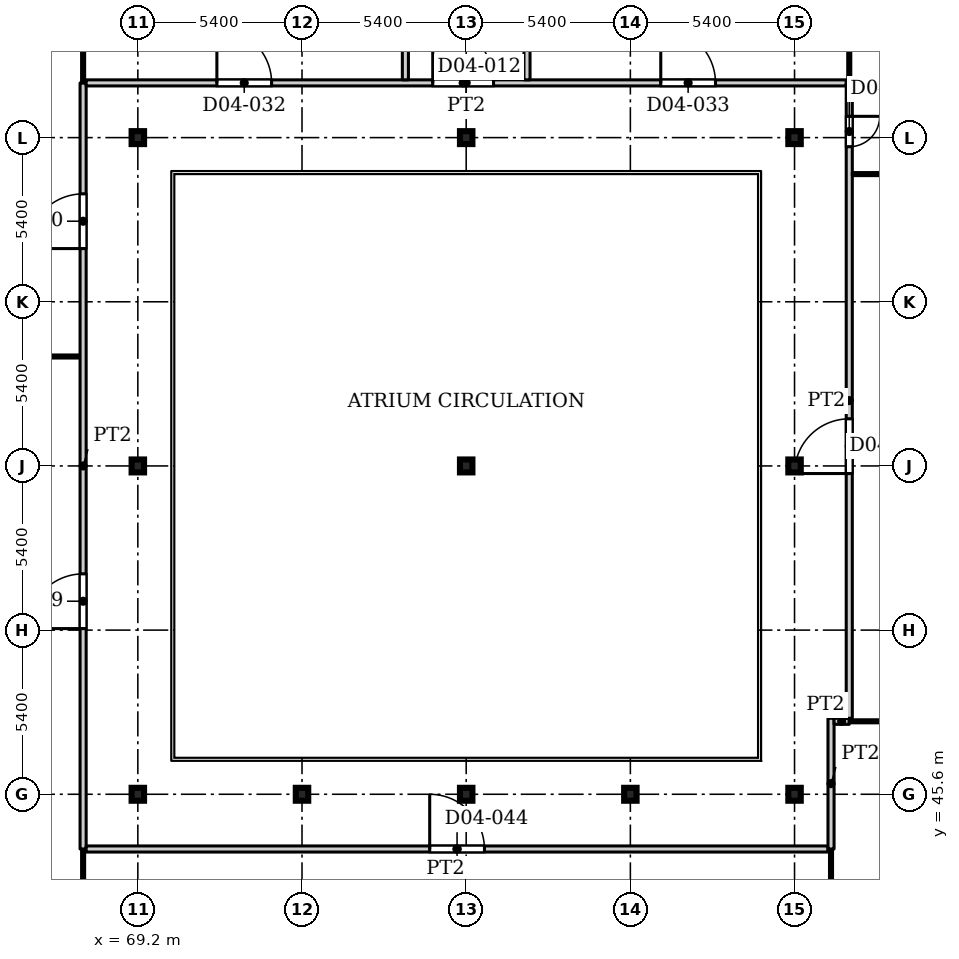
"""IFC4 building model, lengths in metres.
Left out: names, types, materials, properties, quantities, classifications, styles, units other than length and angle.
Written with IfcOpenShell. Run it as: python <this file> out.ifc"""

import sys

from ifc_helpers import new_model, si_unit, direction, frame, frame_2d, origin, origin_2d, place, context, subcontext, project, spatial, rectangle, i_section, extrude, source, transform, mapped, element, fill, save


model = new_model("IFC4")
c1 = context("Model", 3, precision=1e-05, world=origin(), true_north=direction((0.0, 1.0)))
c2 = subcontext(c1, "Body", "Model", "MODEL_VIEW")
j1 = project(units=[si_unit("LENGTHUNIT", "METRE"), si_unit("PLANEANGLEUNIT", "RADIAN")], contexts=[c1])
p1 = place(None, origin())
s1 = spatial("IfcSite", under=j1, at=p1, CompositionType="ELEMENT")
p2 = place(p1, origin())
s2 = spatial("IfcBuilding", under=s1, at=p2, CompositionType="ELEMENT")
p3 = place(p2, frame((0.0, 0.0, 21.5)))
s3 = spatial("IfcBuildingStorey", under=s2, at=p3, CompositionType="ELEMENT", Elevation=21.5)
for number, where, z_axis, x_axis in (
    (1, (69.2, 45.6, 0.0), (0.0, 0.0, 1.0), (1.0, 0.0, 0.0)),
    (2, (80.0, 45.6, 0.0), (0.0, 0.0, 1.0), (1.0, 0.0, 0.0)),
    (3, (90.8, 45.6, 0.0), (0.0, 0.0, 1.0), (1.0, 0.0, 0.0)),
    (4, (69.2, 56.4, 0.0), (0.0, 0.0, 1.0), (1.0, 0.0, 0.0)),
    (5, (80.0, 56.4, 0.0), (0.0, 0.0, 1.0), (1.0, 0.0, 0.0)),
    (6, (90.8, 56.4, 0.0), (0.0, 0.0, 1.0), (1.0, 0.0, 0.0)),
    (7, (69.2, 67.2, 0.0), (0.0, 0.0, 1.0), (1.0, 0.0, 0.0)),
    (8, (80.0, 67.2, 0.0), (0.0, 0.0, 1.0), (1.0, 0.0, 0.0)),
    (9, (90.8, 67.2, 0.0), (0.0, 0.0, 1.0), (1.0, 0.0, 0.0)),
    (10, (74.6, 45.6, 0.0), (0.0, 0.0, 1.0), (1.0, 0.0, 0.0)),
    (11, (85.4, 45.6, 0.0), (0.0, 0.0, 1.0), (1.0, 0.0, 0.0)),
):
    element("IfcColumn", number, at=place(p3, frame(where, z_axis=z_axis, x_axis=x_axis)), inside=s3, PredefinedType="COLUMN", context=c2, shape_type="SweptSolid", body=[
        extrude(i_section(OverallWidth=0.409, OverallDepth=0.425, WebThickness=0.033, FlangeThickness=0.052, FilletRadius=0.013, at=origin_2d()), origin(), (0.0, 0.0, 1.0), 4.5),
    ])
p4 = place(p3, frame((33.45, 60.0, 0.0), z_axis=(0.0, 0.0, 1.0), x_axis=(1.0, 0.0, 0.0)))
e12 = element("IfcWall", 12, at=p4, inside=s3, PredefinedType="PARTITIONING", context=c2, shape_type="SweptSolid", body=[
    extrude(rectangle(XDim=33.85, YDim=0.1, at=frame_2d((16.925, 0.0))), origin(), (0.0, 0.0, 1.0), 4.18),
])
p5 = place(p3, frame((67.4, 30.05, 0.0), z_axis=(0.0, 0.0, 1.0), x_axis=(0.0, 1.0, 0.0)))
e13 = element("IfcWall", 13, at=p5, inside=s3, PredefinedType="PARTITIONING", context=c2, shape_type="SweptSolid", body=[
    extrude(rectangle(XDim=13.75, YDim=0.1, at=frame_2d((6.875, 0.0))), origin(), (0.0, 0.0, 1.0), 4.18),
])
p6 = place(p3, frame((67.4, 43.8, 0.0), z_axis=(0.0, 0.0, 1.0), x_axis=(0.0, 1.0, 0.0)))
e14 = element("IfcWall", 14, at=p6, inside=s3, PredefinedType="PARTITIONING", context=c2, shape_type="SweptSolid", body=[
    extrude(rectangle(XDim=25.2, YDim=0.2, at=frame_2d((12.6, 0.0))), origin(), (0.0, 0.0, 1.0), 4.18),
])
p7 = place(p6, frame((7.25, 0.0, 0.0)))
e15 = element("IfcOpeningElement", 15, at=p7, cuts=e14, PredefinedType="OPENING", context=c2, shape_type="SweptSolid", body=[
    extrude(rectangle(XDim=1.8, YDim=2.1, at=frame_2d((0.9, 1.05))), frame((0.0, 0.11, 0.0), z_axis=(0.0, -1.0, 0.0), x_axis=(1.0, 0.0, 0.0)), (0.0, 0.0, 1.0), 0.22),
])
p8 = place(p6, frame((19.75, 0.0, 0.0)))
e16 = element("IfcOpeningElement", 16, at=p8, cuts=e14, PredefinedType="OPENING", context=c2, shape_type="SweptSolid", body=[
    extrude(rectangle(XDim=1.8, YDim=2.1, at=frame_2d((0.9, 1.05))), frame((0.0, 0.11, 0.0), z_axis=(0.0, -1.0, 0.0), x_axis=(1.0, 0.0, 0.0)), (0.0, 0.0, 1.0), 0.22),
])
p9 = place(p3, frame((67.4, 69.0, 0.0), z_axis=(0.0, 0.0, 1.0), x_axis=(0.0, 1.0, 0.0)))
e17 = element("IfcWall", 17, at=p9, inside=s3, PredefinedType="PARTITIONING", context=c2, shape_type="SweptSolid", body=[
    extrude(rectangle(XDim=21.738, YDim=0.1, at=frame_2d((10.869, 0.0))), origin(), (0.0, 0.0, 1.0), 4.18),
])
p10 = place(p3, frame((67.5, 43.8, 0.0), z_axis=(0.0, 0.0, 1.0), x_axis=(1.0, 0.0, 0.0)))
e18 = element("IfcWall", 18, at=p10, inside=s3, PredefinedType="PARTITIONING", context=c2, shape_type="SweptSolid", body=[
    extrude(rectangle(XDim=24.4, YDim=0.2, at=frame_2d((12.2, 0.0))), origin(), (0.0, 0.0, 1.0), 4.18),
])
p11 = place(p10, frame((11.3, 0.0, 0.0)))
e19 = element("IfcOpeningElement", 19, at=p11, cuts=e18, PredefinedType="OPENING", context=c2, shape_type="SweptSolid", body=[
    extrude(rectangle(XDim=1.8, YDim=2.1, at=frame_2d((0.9, 1.05))), frame((0.0, 0.11, 0.0), z_axis=(0.0, -1.0, 0.0), x_axis=(1.0, 0.0, 0.0)), (0.0, 0.0, 1.0), 0.22),
])
p12 = place(p3, frame((67.5, 69.0, 0.0), z_axis=(0.0, 0.0, 1.0), x_axis=(1.0, 0.0, 0.0)))
e20 = element("IfcWall", 20, at=p12, inside=s3, PredefinedType="PARTITIONING", context=c2, shape_type="SweptSolid", body=[
    extrude(rectangle(XDim=25.0, YDim=0.2, at=frame_2d((12.5, 0.0))), origin(), (0.0, 0.0, 1.0), 4.18),
])
p13 = place(p12, frame((11.4, 0.0, 0.0)))
e21 = element("IfcOpeningElement", 21, at=p13, cuts=e20, PredefinedType="OPENING", context=c2, shape_type="SweptSolid", body=[
    extrude(rectangle(XDim=2.0, YDim=2.1, at=frame_2d((1.0, 1.05))), frame((0.0, 0.11, 0.0), z_axis=(0.0, -1.0, 0.0), x_axis=(1.0, 0.0, 0.0)), (0.0, 0.0, 1.0), 0.22),
])
p14 = place(p12, frame((4.3, 0.0, 0.0)))
e22 = element("IfcOpeningElement", 22, at=p14, cuts=e20, PredefinedType="OPENING", context=c2, shape_type="SweptSolid", body=[
    extrude(rectangle(XDim=1.8, YDim=2.1, at=frame_2d((0.9, 1.05))), frame((0.0, 0.11, 0.0), z_axis=(0.0, -1.0, 0.0), x_axis=(1.0, 0.0, 0.0)), (0.0, 0.0, 1.0), 0.22),
])
p15 = place(p12, frame((18.9, 0.0, 0.0)))
e23 = element("IfcOpeningElement", 23, at=p15, cuts=e20, PredefinedType="OPENING", context=c2, shape_type="SweptSolid", body=[
    extrude(rectangle(XDim=1.8, YDim=2.1, at=frame_2d((0.9, 1.05))), frame((0.0, 0.11, 0.0), z_axis=(0.0, -1.0, 0.0), x_axis=(1.0, 0.0, 0.0)), (0.0, 0.0, 1.0), 0.22),
])
for number, where, z_axis, x_axis in (
    (24, (78.0, 69.1, 0.0), (0.0, 0.0, 1.0), (0.0, 1.0, 0.0)),
    (25, (82.0, 69.1, 0.0), (0.0, 0.0, 1.0), (0.0, 1.0, 0.0)),
):
    element("IfcWall", number, at=place(p3, frame(where, z_axis=z_axis, x_axis=x_axis)), inside=s3, PredefinedType="PARTITIONING", context=c2, shape_type="SweptSolid", body=[
        extrude(rectangle(XDim=21.6, YDim=0.2, at=frame_2d((10.8, 0.0))), origin(), (0.0, 0.0, 1.0), 4.18),
    ])
p16 = place(p3, frame((92.0, 35.2, 0.0), z_axis=(0.0, 0.0, 1.0), x_axis=(0.0, 1.0, 0.0)))
e26 = element("IfcWall", 26, at=p16, inside=s3, PredefinedType="PARTITIONING", context=c2, shape_type="SweptSolid", body=[
    extrude(rectangle(XDim=8.6, YDim=0.1, at=frame_2d((4.3, 0.0))), origin(), (0.0, 0.0, 1.0), 4.18),
])
p17 = place(p3, frame((92.0, 43.8, 0.0), z_axis=(0.0, 0.0, 1.0), x_axis=(0.0, 1.0, 0.0)))
e27 = element("IfcWall", 27, at=p17, inside=s3, PredefinedType="PARTITIONING", context=c2, shape_type="SweptSolid", body=[
    extrude(rectangle(XDim=4.3, YDim=0.2, at=frame_2d((2.15, 0.0))), origin(), (0.0, 0.0, 1.0), 4.18),
])
p18 = place(p3, frame((92.1, 48.0, 0.0), z_axis=(0.0, 0.0, 1.0), x_axis=(1.0, 0.0, 0.0)))
e28 = element("IfcWall", 28, at=p18, inside=s3, PredefinedType="PARTITIONING", context=c2, shape_type="SweptSolid", body=[
    extrude(rectangle(XDim=0.5, YDim=0.2, at=frame_2d((0.25, 0.0))), origin(), (0.0, 0.0, 1.0), 4.18),
])
p19 = place(p3, frame((92.6, 48.0, 0.0), z_axis=(0.0, 0.0, 1.0), x_axis=(1.0, 0.0, 0.0)))
e29 = element("IfcWall", 29, at=p19, inside=s3, PredefinedType="PARTITIONING", context=c2, shape_type="SweptSolid", body=[
    extrude(rectangle(XDim=20.138, YDim=0.1, at=frame_2d((10.069, 0.0))), origin(), (0.0, 0.0, 1.0), 4.18),
])
p20 = place(p3, frame((92.6, 48.1, 0.0), z_axis=(0.0, 0.0, 1.0), x_axis=(0.0, 1.0, 0.0)))
e30 = element("IfcWall", 30, at=p20, inside=s3, PredefinedType="PARTITIONING", context=c2, shape_type="SweptSolid", body=[
    extrude(rectangle(XDim=20.9, YDim=0.2, at=frame_2d((10.45, 0.0))), origin(), (0.0, 0.0, 1.0), 4.18),
])
p21 = place(p20, frame((8.05, 0.0, 0.0)))
e31 = element("IfcOpeningElement", 31, at=p21, cuts=e30, PredefinedType="OPENING", context=c2, shape_type="SweptSolid", body=[
    extrude(rectangle(XDim=1.8, YDim=2.1, at=frame_2d((0.9, 1.05))), frame((0.0, 0.11, 0.0), z_axis=(0.0, -1.0, 0.0), x_axis=(1.0, 0.0, 0.0)), (0.0, 0.0, 1.0), 0.22),
])
p22 = place(p20, frame((18.8, 0.0, 0.0)))
e32 = element("IfcOpeningElement", 32, at=p22, cuts=e30, PredefinedType="OPENING", context=c2, shape_type="SweptSolid", body=[
    extrude(rectangle(XDim=1.0, YDim=2.1, at=frame_2d((0.5, 1.05))), frame((0.0, 0.11, 0.0), z_axis=(0.0, -1.0, 0.0), x_axis=(1.0, 0.0, 0.0)), (0.0, 0.0, 1.0), 0.22),
])
p23 = place(p3, frame((92.6, 69.0, 0.0), z_axis=(0.0, 0.0, 1.0), x_axis=(0.0, 1.0, 0.0)))
e33 = element("IfcWall", 33, at=p23, inside=s3, PredefinedType="PARTITIONING", context=c2, shape_type="SweptSolid", body=[
    extrude(rectangle(XDim=21.738, YDim=0.1, at=frame_2d((10.869, 0.0))), origin(), (0.0, 0.0, 1.0), 4.18),
])
p24 = place(p3, frame((92.7, 66.0, 0.0), z_axis=(0.0, 0.0, 1.0), x_axis=(1.0, 0.0, 0.0)))
e34 = element("IfcWall", 34, at=p24, inside=s3, PredefinedType="PARTITIONING", context=c2, shape_type="SweptSolid", body=[
    extrude(rectangle(XDim=20.038, YDim=0.1, at=frame_2d((10.019, 0.0))), origin(), (0.0, 0.0, 1.0), 4.18),
])
m1 = source(origin(), c2, "Body", "SweptSolid", [
    extrude(rectangle(XDim=1.8, YDim=2.1, at=frame_2d((0.9, 1.05))), frame((0.0, 0.025, 0.0), z_axis=(0.0, -1.0, 0.0), x_axis=(1.0, 0.0, 0.0)), (0.0, 0.0, 1.0), 0.05),
])
p25 = place(p21, origin())
e35 = element("IfcDoor", 35, at=p25, inside=s3, OperationType="DOUBLE_DOOR_SINGLE_SWING", PredefinedType="DOOR", context=c2, shape_type="MappedRepresentation", body=[
    mapped(m1, transform((0.0, 0.0, 0.0), x_axis=(1.0, 0.0, 0.0), y_axis=(0.0, 1.0, 0.0), z_axis=(0.0, 0.0, 1.0), scale=1.0)),
])
fill(e31, e35)
m2 = source(origin(), c2, "Body", "SweptSolid", [
    extrude(rectangle(XDim=1.0, YDim=2.1, at=frame_2d((0.5, 1.05))), frame((0.0, 0.025, 0.0), z_axis=(0.0, -1.0, 0.0), x_axis=(1.0, 0.0, 0.0)), (0.0, 0.0, 1.0), 0.05),
])
p26 = place(p22, origin())
e36 = element("IfcDoor", 36, at=p26, inside=s3, OperationType="SINGLE_SWING_RIGHT", PredefinedType="DOOR", context=c2, shape_type="MappedRepresentation", body=[
    mapped(m2, transform((0.0, 0.0, 0.0), x_axis=(1.0, 0.0, 0.0), y_axis=(0.0, 1.0, 0.0), z_axis=(0.0, 0.0, 1.0), scale=1.0)),
])
fill(e32, e36)
m3 = source(origin(), c2, "Body", "SweptSolid", [
    extrude(rectangle(XDim=2.0, YDim=2.1, at=frame_2d((1.0, 1.05))), frame((0.0, 0.025, 0.0), z_axis=(0.0, -1.0, 0.0), x_axis=(1.0, 0.0, 0.0)), (0.0, 0.0, 1.0), 0.05),
])
p27 = place(p13, origin())
e37 = element("IfcDoor", 37, at=p27, inside=s3, OperationType="DOUBLE_DOOR_SINGLE_SWING", PredefinedType="DOOR", context=c2, shape_type="MappedRepresentation", body=[
    mapped(m3, transform((0.0, 0.0, 0.0), x_axis=(1.0, 0.0, 0.0), y_axis=(0.0, 1.0, 0.0), z_axis=(0.0, 0.0, 1.0), scale=1.0)),
])
fill(e21, e37)
p28 = place(p14, origin())
e38 = element("IfcDoor", 38, at=p28, inside=s3, OperationType="DOUBLE_DOOR_SINGLE_SWING", PredefinedType="DOOR", context=c2, shape_type="MappedRepresentation", body=[
    mapped(m1, transform((0.0, 0.0, 0.0), x_axis=(1.0, 0.0, 0.0), y_axis=(0.0, 1.0, 0.0), z_axis=(0.0, 0.0, 1.0), scale=1.0)),
])
fill(e22, e38)
p29 = place(p15, origin())
e39 = element("IfcDoor", 39, at=p29, inside=s3, OperationType="DOUBLE_DOOR_SINGLE_SWING", PredefinedType="DOOR", context=c2, shape_type="MappedRepresentation", body=[
    mapped(m1, transform((0.0, 0.0, 0.0), x_axis=(1.0, 0.0, 0.0), y_axis=(0.0, 1.0, 0.0), z_axis=(0.0, 0.0, 1.0), scale=1.0)),
])
fill(e23, e39)
p30 = place(p11, origin())
e40 = element("IfcDoor", 40, at=p30, inside=s3, OperationType="DOUBLE_DOOR_SINGLE_SWING", PredefinedType="DOOR", context=c2, shape_type="MappedRepresentation", body=[
    mapped(m1, transform((0.0, 0.0, 0.0), x_axis=(1.0, 0.0, 0.0), y_axis=(0.0, 1.0, 0.0), z_axis=(0.0, 0.0, 1.0), scale=1.0)),
])
fill(e19, e40)
p31 = place(p7, origin())
e41 = element("IfcDoor", 41, at=p31, inside=s3, OperationType="DOUBLE_DOOR_SINGLE_SWING", PredefinedType="DOOR", context=c2, shape_type="MappedRepresentation", body=[
    mapped(m1, transform((0.0, 0.0, 0.0), x_axis=(1.0, 0.0, 0.0), y_axis=(0.0, 1.0, 0.0), z_axis=(0.0, 0.0, 1.0), scale=1.0)),
])
fill(e15, e41)
p32 = place(p8, origin())
e42 = element("IfcDoor", 42, at=p32, inside=s3, OperationType="DOUBLE_DOOR_SINGLE_SWING", PredefinedType="DOOR", context=c2, shape_type="MappedRepresentation", body=[
    mapped(m1, transform((0.0, 0.0, 0.0), x_axis=(1.0, 0.0, 0.0), y_axis=(0.0, 1.0, 0.0), z_axis=(0.0, 0.0, 1.0), scale=1.0)),
])
fill(e16, e42)
save(model, sys.argv[1])
